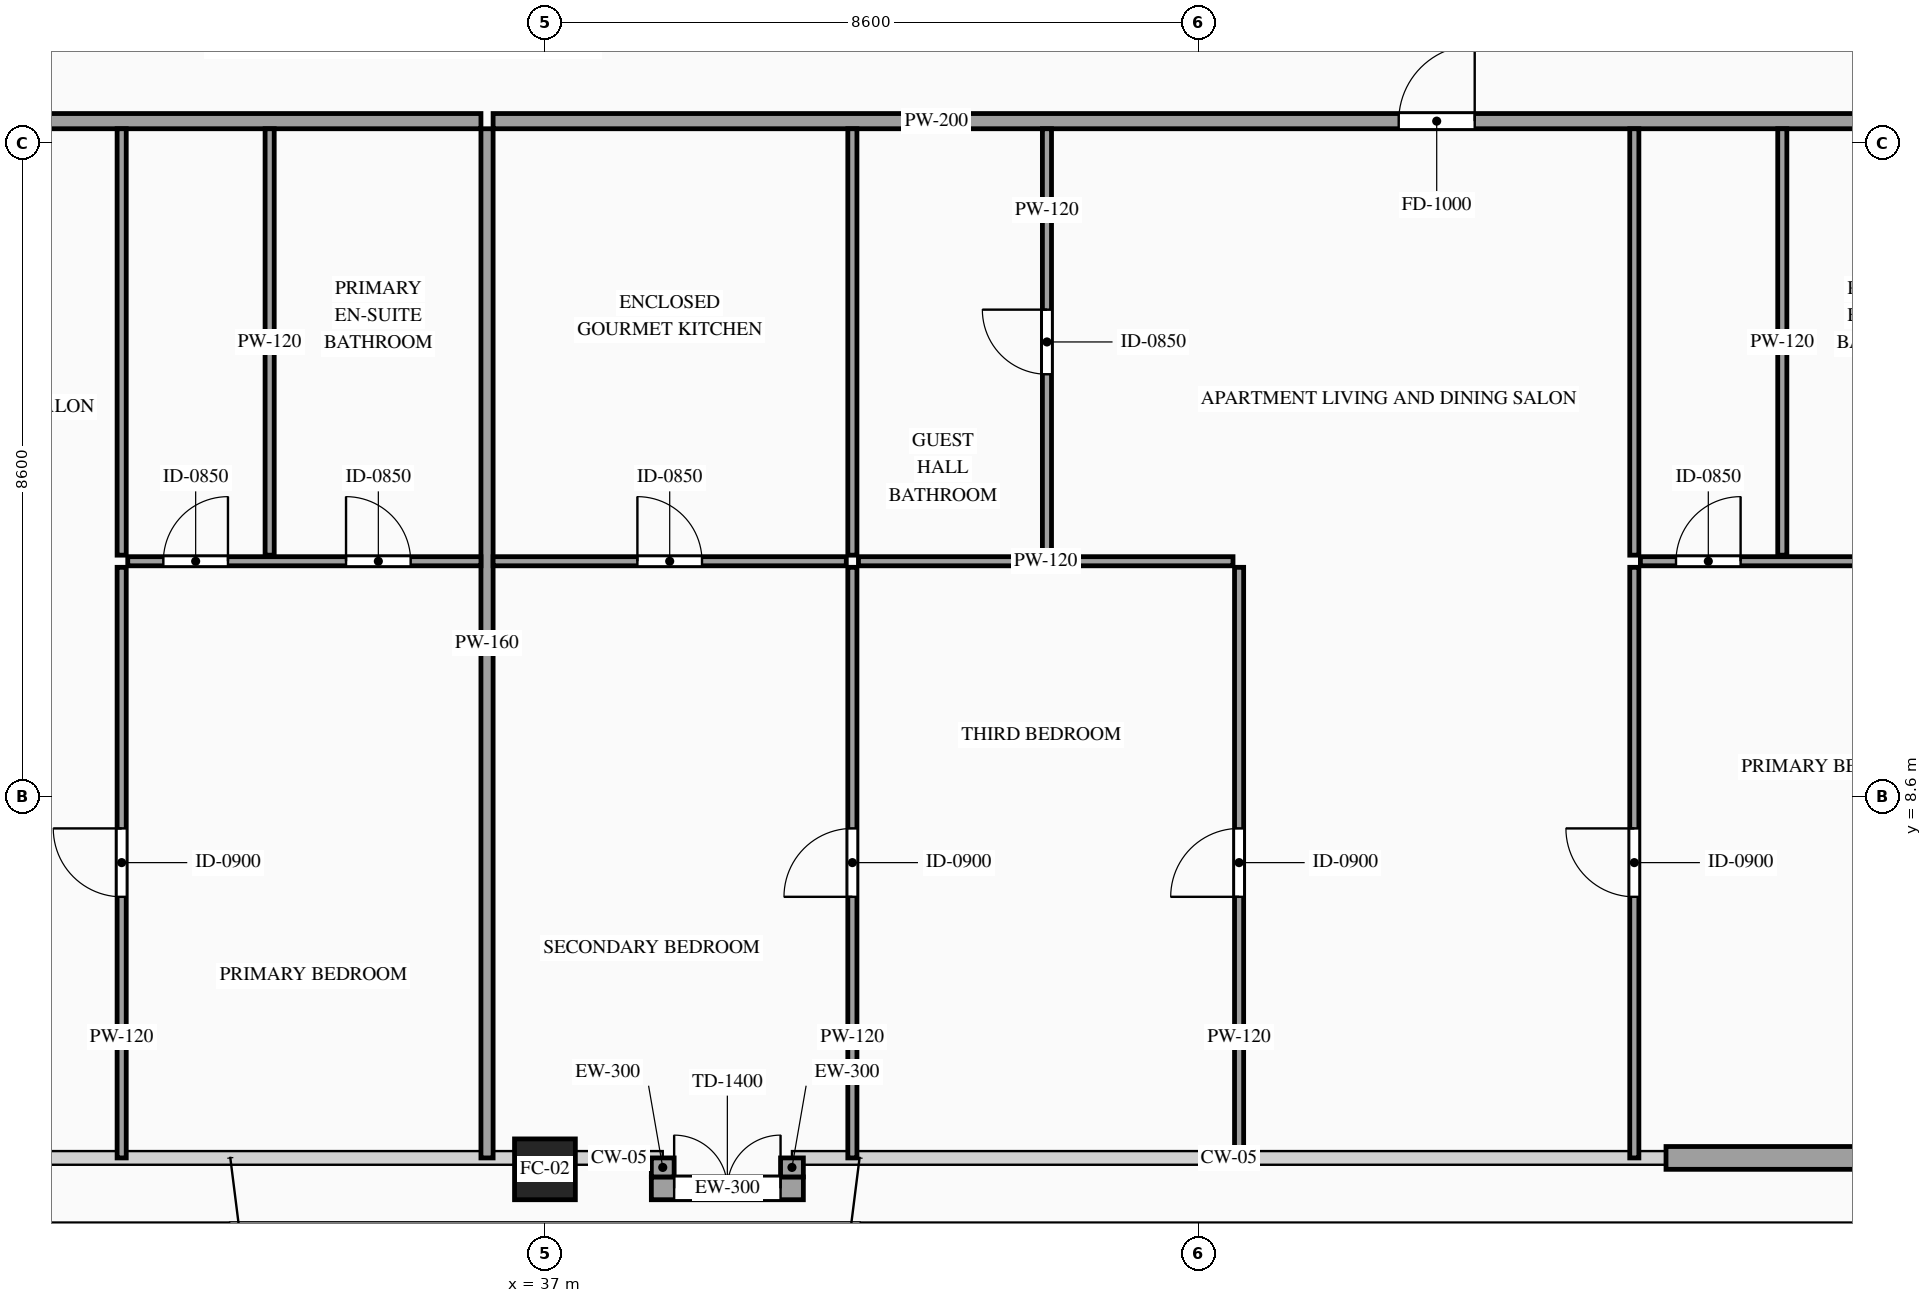
"""IFC4 building model, lengths in metres.
Left out: names, types, materials, properties, quantities, classifications, styles, units other than length and angle.
Written with IfcOpenShell. Run it as: python <this file> out.ifc"""

import sys

from ifc_helpers import new_model, si_unit, direction, frame, frame_2d, origin, origin_2d, place, context, subcontext, project, spatial, rectangle, hollow_rectangle, extrude, source, transform, mapped, element, fill, save


model = new_model("IFC4")
c1 = context("Model", 3, precision=1e-05, world=origin(), true_north=direction((0.0, 1.0)))
c2 = subcontext(c1, "Body", "Model", "MODEL_VIEW")
j1 = project(units=[si_unit("LENGTHUNIT", "METRE"), si_unit("PLANEANGLEUNIT", "RADIAN")], contexts=[c1])
p1 = place(None, origin())
s1 = spatial("IfcSite", under=j1, at=p1, CompositionType="ELEMENT")
p2 = place(p1, origin())
s2 = spatial("IfcBuilding", under=s1, at=p2, CompositionType="ELEMENT")
p3 = place(p2, frame((0.0, 0.0, 198.5)))
s3 = spatial("IfcBuildingStorey", under=s2, at=p3, CompositionType="ELEMENT", Elevation=198.5)
m1 = source(origin(), c2, "Body", "SweptSolid", [
    extrude(hollow_rectangle(XDim=0.8, YDim=0.8, WallThickness=0.036, at=origin_2d()), origin(), (0.0, 0.0, 1.0), 3.5),
])
p4 = place(p3, frame((37.0, 3.7, 0.0), z_axis=(0.0, 0.0, 1.0), x_axis=(1.0, 0.0, 0.0)))
e1 = element("IfcColumn", 1, at=p4, inside=s3, PredefinedType="COLUMN", context=c2, shape_type="MappedRepresentation", body=[
    mapped(m1, transform((0.0, 0.0, 0.0), scale=1.0)),
])
m2 = source(origin(), c2, "Body", "SweptSolid", [
    extrude(rectangle(XDim=3.05, YDim=0.3, at=frame_2d((1.525, 0.0))), origin(), (0.0, 0.0, 1.0), 2.835),
])
p5 = place(p3, frame((51.75, 3.85, 0.0), z_axis=(0.0, 0.0, 1.0), x_axis=(1.0, 0.0, 0.0)))
e2 = element("IfcWall", 2, at=p5, inside=s3, PredefinedType="SOLIDWALL", context=c2, shape_type="MappedRepresentation", body=[
    mapped(m2, transform((0.0, 0.0, 0.0), scale=1.0)),
])
p6 = place(p3, frame((38.4, 3.45, 0.0), z_axis=(0.0, 0.0, 1.0), x_axis=(1.0, 0.0, 0.0)))
e3 = element("IfcWall", 3, at=p6, inside=s3, PredefinedType="SOLIDWALL", context=c2, shape_type="SweptSolid", body=[
    extrude(rectangle(XDim=2.0, YDim=0.3, at=frame_2d((1.0, 0.0))), origin(), (0.0, 0.0, 1.0), 2.835),
])
p7 = place(p6, frame((0.3, 0.0, 0.0)))
e4 = element("IfcOpeningElement", 4, at=p7, cuts=e3, PredefinedType="OPENING", context=c2, shape_type="SweptSolid", body=[
    extrude(rectangle(XDim=1.4, YDim=2.3, at=frame_2d((0.7, 1.15))), frame((0.0, 0.165, 0.0), z_axis=(0.0, -1.0, 0.0), x_axis=(1.0, 0.0, 0.0)), (0.0, 0.0, 1.0), 0.33),
])
m3 = source(origin(), c2, "Body", "SweptSolid", [
    extrude(rectangle(XDim=0.25, YDim=0.3, at=frame_2d((0.125, 0.0))), origin(), (0.0, 0.0, 1.0), 3.28),
])
for number, where, z_axis, x_axis in (
    (5, (38.55, 3.85, 0.0), (0.0, 0.0, 1.0), (0.0, -1.0, 0.0)),
    (6, (40.25, 3.6, 0.0), (0.0, 0.0, 1.0), (0.0, 1.0, 0.0)),
):
    element("IfcWall", number, at=place(p3, frame(where, z_axis=z_axis, x_axis=x_axis)), inside=s3, PredefinedType="SOLIDWALL", context=c2, shape_type="MappedRepresentation", body=[
        mapped(m3, transform((0.0, 0.0, 0.0), scale=1.0)),
    ])
p8 = place(p3, frame((17.94, 17.49, 0.0), z_axis=(0.0, 0.0, 1.0), x_axis=(1.0, 0.0, 0.0)))
e7 = element("IfcWall", 7, at=p8, inside=s3, PredefinedType="PARTITIONING", context=c2, shape_type="SweptSolid", body=[
    extrude(rectangle(XDim=18.218, YDim=0.2, at=frame_2d((9.109, 0.0))), origin(), (0.0, 0.0, 1.0), 3.28),
])
p9 = place(p8, frame((10.556, 0.0, 0.0)))
e8 = element("IfcOpeningElement", 8, at=p9, cuts=e7, PredefinedType="OPENING", context=c2, shape_type="SweptSolid", body=[
    extrude(rectangle(XDim=1.0, YDim=2.2, at=frame_2d((0.5, 1.1))), frame((0.0, 0.115, 0.0), z_axis=(0.0, -1.0, 0.0), x_axis=(1.0, 0.0, 0.0)), (0.0, 0.0, 1.0), 0.23),
])
m4 = source(origin(), c2, "Body", "SweptSolid", [
    extrude(rectangle(XDim=13.54, YDim=0.16, at=frame_2d((6.77, 0.0))), origin(), (0.0, 0.0, 1.0), 3.28),
])
p10 = place(p3, frame((36.238, 3.85, 0.0), z_axis=(0.0, 0.0, 1.0), x_axis=(0.0, 1.0, 0.0)))
e9 = element("IfcWall", 9, at=p10, inside=s3, PredefinedType="PARTITIONING", context=c2, shape_type="MappedRepresentation", body=[
    mapped(m4, transform((0.0, 0.0, 0.0), scale=1.0)),
])
m5 = source(origin(), c2, "Body", "SweptSolid", [
    extrude(rectangle(XDim=5.61, YDim=0.12, at=frame_2d((2.805, 0.0))), origin(), (0.0, 0.0, 1.0), 3.28),
])
for number, where, z_axis, x_axis in (
    (10, (33.378, 11.78, 0.0), (0.0, 0.0, 1.0), (0.0, 1.0, 0.0)),
    (11, (31.431, 11.78, 0.0), (0.0, 0.0, 1.0), (0.0, 1.0, 0.0)),
):
    element("IfcWall", number, at=place(p3, frame(where, z_axis=z_axis, x_axis=x_axis)), inside=s3, PredefinedType="PARTITIONING", context=c2, shape_type="MappedRepresentation", body=[
        mapped(m5, transform((0.0, 0.0, 0.0), scale=1.0)),
    ])
p11 = place(p3, frame((31.511, 11.7, 0.0), z_axis=(0.0, 0.0, 1.0), x_axis=(1.0, 0.0, 0.0)))
e12 = element("IfcWall", 12, at=p11, inside=s3, PredefinedType="PARTITIONING", context=c2, shape_type="SweptSolid", body=[
    extrude(rectangle(XDim=4.647, YDim=0.12, at=frame_2d((2.323, 0.0))), origin(), (0.0, 0.0, 1.0), 2.875),
])
p12 = place(p11, frame((2.872, 0.0, 0.0)))
e13 = element("IfcOpeningElement", 13, at=p12, cuts=e12, PredefinedType="OPENING", context=c2, shape_type="SweptSolid", body=[
    extrude(rectangle(XDim=0.85, YDim=2.1, at=frame_2d((0.425, 1.05))), frame((0.0, 0.075, 0.0), z_axis=(0.0, -1.0, 0.0), x_axis=(1.0, 0.0, 0.0)), (0.0, 0.0, 1.0), 0.15),
])
p13 = place(p11, frame((0.469, 0.0, 0.0)))
e14 = element("IfcOpeningElement", 14, at=p13, cuts=e12, PredefinedType="OPENING", context=c2, shape_type="SweptSolid", body=[
    extrude(rectangle(XDim=0.85, YDim=2.1, at=frame_2d((0.425, 1.05))), frame((0.0, 0.075, 0.0), z_axis=(0.0, -1.0, 0.0), x_axis=(1.0, 0.0, 0.0)), (0.0, 0.0, 1.0), 0.15),
])
p14 = place(p3, frame((31.431, 3.85, 0.0), z_axis=(0.0, 0.0, 1.0), x_axis=(0.0, 1.0, 0.0)))
e15 = element("IfcWall", 15, at=p14, inside=s3, PredefinedType="PARTITIONING", context=c2, shape_type="SweptSolid", body=[
    extrude(rectangle(XDim=7.77, YDim=0.12, at=frame_2d((3.885, 0.0))), origin(), (0.0, 0.0, 1.0), 3.28),
])
p15 = place(p14, frame((3.435, 0.0, 0.0)))
e16 = element("IfcOpeningElement", 16, at=p15, cuts=e15, PredefinedType="OPENING", context=c2, shape_type="SweptSolid", body=[
    extrude(rectangle(XDim=0.9, YDim=2.15, at=frame_2d((0.45, 1.075))), frame((0.0, 0.075, 0.0), z_axis=(0.0, -1.0, 0.0), x_axis=(1.0, 0.0, 0.0)), (0.0, 0.0, 1.0), 0.15),
])
p16 = place(p3, frame((36.318, 17.49, 0.0), z_axis=(0.0, 0.0, 1.0), x_axis=(1.0, 0.0, 0.0)))
e17 = element("IfcWall", 17, at=p16, inside=s3, PredefinedType="PARTITIONING", context=c2, shape_type="SweptSolid", body=[
    extrude(rectangle(XDim=19.742, YDim=0.2, at=frame_2d((9.871, 0.0))), origin(), (0.0, 0.0, 1.0), 3.28),
])
p17 = place(p16, frame((11.915, 0.0, 0.0)))
e18 = element("IfcOpeningElement", 18, at=p17, cuts=e17, PredefinedType="OPENING", context=c2, shape_type="SweptSolid", body=[
    extrude(rectangle(XDim=1.0, YDim=2.2, at=frame_2d((0.5, 1.1))), frame((0.0, 0.115, 0.0), z_axis=(0.0, -1.0, 0.0), x_axis=(1.0, 0.0, 0.0)), (0.0, 0.0, 1.0), 0.23),
])
p18 = place(p3, frame((36.318, 11.7, 0.0), z_axis=(0.0, 0.0, 1.0), x_axis=(1.0, 0.0, 0.0)))
e19 = element("IfcWall", 19, at=p18, inside=s3, PredefinedType="PARTITIONING", context=c2, shape_type="SweptSolid", body=[
    extrude(rectangle(XDim=4.647, YDim=0.12, at=frame_2d((2.323, 0.0))), origin(), (0.0, 0.0, 1.0), 2.875),
])
p19 = place(p18, frame((1.898, 0.0, 0.0)))
e20 = element("IfcOpeningElement", 20, at=p19, cuts=e19, PredefinedType="OPENING", context=c2, shape_type="SweptSolid", body=[
    extrude(rectangle(XDim=0.85, YDim=2.1, at=frame_2d((0.425, 1.05))), frame((0.0, 0.075, 0.0), z_axis=(0.0, -1.0, 0.0), x_axis=(1.0, 0.0, 0.0)), (0.0, 0.0, 1.0), 0.15),
])
p20 = place(p3, frame((41.045, 11.78, 0.0), z_axis=(0.0, 0.0, 1.0), x_axis=(0.0, 1.0, 0.0)))
e21 = element("IfcWall", 21, at=p20, inside=s3, PredefinedType="PARTITIONING", context=c2, shape_type="MappedRepresentation", body=[
    mapped(m5, transform((0.0, 0.0, 0.0), scale=1.0)),
])
p21 = place(p3, frame((43.605, 11.78, 0.0), z_axis=(0.0, 0.0, 1.0), x_axis=(0.0, 1.0, 0.0)))
e22 = element("IfcWall", 22, at=p21, inside=s3, PredefinedType="PARTITIONING", context=c2, shape_type="SweptSolid", body=[
    extrude(rectangle(XDim=5.61, YDim=0.12, at=frame_2d((2.805, 0.0))), origin(), (0.0, 0.0, 1.0), 3.28),
])
p22 = place(p21, frame((2.38, 0.0, 0.0)))
e23 = element("IfcOpeningElement", 23, at=p22, cuts=e22, PredefinedType="OPENING", context=c2, shape_type="SweptSolid", body=[
    extrude(rectangle(XDim=0.85, YDim=2.1, at=frame_2d((0.425, 1.05))), frame((0.0, 0.075, 0.0), z_axis=(0.0, -1.0, 0.0), x_axis=(1.0, 0.0, 0.0)), (0.0, 0.0, 1.0), 0.15),
])
for number, where, z_axis, x_axis in (
    (24, (53.28, 11.78, 0.0), (0.0, 0.0, 1.0), (0.0, 1.0, 0.0)),
    (25, (51.333, 11.78, 0.0), (0.0, 0.0, 1.0), (0.0, 1.0, 0.0)),
):
    element("IfcWall", number, at=place(p3, frame(where, z_axis=z_axis, x_axis=x_axis)), inside=s3, PredefinedType="PARTITIONING", context=c2, shape_type="MappedRepresentation", body=[
        mapped(m5, transform((0.0, 0.0, 0.0), scale=1.0)),
    ])
p23 = place(p3, frame((41.045, 3.85, 0.0), z_axis=(0.0, 0.0, 1.0), x_axis=(0.0, 1.0, 0.0)))
e26 = element("IfcWall", 26, at=p23, inside=s3, PredefinedType="PARTITIONING", context=c2, shape_type="SweptSolid", body=[
    extrude(rectangle(XDim=7.77, YDim=0.12, at=frame_2d((3.885, 0.0))), origin(), (0.0, 0.0, 1.0), 3.28),
])
p24 = place(p23, frame((3.435, 0.0, 0.0)))
e27 = element("IfcOpeningElement", 27, at=p24, cuts=e26, PredefinedType="OPENING", context=c2, shape_type="SweptSolid", body=[
    extrude(rectangle(XDim=0.9, YDim=2.15, at=frame_2d((0.45, 1.075))), frame((0.0, 0.075, 0.0), z_axis=(0.0, -1.0, 0.0), x_axis=(1.0, 0.0, 0.0)), (0.0, 0.0, 1.0), 0.15),
])
p25 = place(p3, frame((51.413, 11.7, 0.0), z_axis=(0.0, 0.0, 1.0), x_axis=(1.0, 0.0, 0.0)))
e28 = element("IfcWall", 28, at=p25, inside=s3, PredefinedType="PARTITIONING", context=c2, shape_type="SweptSolid", body=[
    extrude(rectangle(XDim=4.647, YDim=0.12, at=frame_2d((2.323, 0.0))), origin(), (0.0, 0.0, 1.0), 3.28),
])
p26 = place(p25, frame((2.872, 0.0, 0.0)))
e29 = element("IfcOpeningElement", 29, at=p26, cuts=e28, PredefinedType="OPENING", context=c2, shape_type="SweptSolid", body=[
    extrude(rectangle(XDim=0.85, YDim=2.1, at=frame_2d((0.425, 1.05))), frame((0.0, 0.075, 0.0), z_axis=(0.0, -1.0, 0.0), x_axis=(1.0, 0.0, 0.0)), (0.0, 0.0, 1.0), 0.15),
])
p27 = place(p25, frame((0.469, 0.0, 0.0)))
e30 = element("IfcOpeningElement", 30, at=p27, cuts=e28, PredefinedType="OPENING", context=c2, shape_type="SweptSolid", body=[
    extrude(rectangle(XDim=0.85, YDim=2.1, at=frame_2d((0.425, 1.05))), frame((0.0, 0.075, 0.0), z_axis=(0.0, -1.0, 0.0), x_axis=(1.0, 0.0, 0.0)), (0.0, 0.0, 1.0), 0.15),
])
p28 = place(p3, frame((51.333, 3.85, 0.0), z_axis=(0.0, 0.0, 1.0), x_axis=(0.0, 1.0, 0.0)))
e31 = element("IfcWall", 31, at=p28, inside=s3, PredefinedType="PARTITIONING", context=c2, shape_type="SweptSolid", body=[
    extrude(rectangle(XDim=7.77, YDim=0.12, at=frame_2d((3.885, 0.0))), origin(), (0.0, 0.0, 1.0), 3.28),
])
p29 = place(p28, frame((3.435, 0.0, 0.0)))
e32 = element("IfcOpeningElement", 32, at=p29, cuts=e31, PredefinedType="OPENING", context=c2, shape_type="SweptSolid", body=[
    extrude(rectangle(XDim=0.9, YDim=2.15, at=frame_2d((0.45, 1.075))), frame((0.0, 0.075, 0.0), z_axis=(0.0, -1.0, 0.0), x_axis=(1.0, 0.0, 0.0)), (0.0, 0.0, 1.0), 0.15),
])
m6 = source(origin(), c2, "Body", "SweptSolid", [
    extrude(rectangle(XDim=4.928, YDim=0.12, at=frame_2d((2.464, 0.0))), origin(), (0.0, 0.0, 1.0), 2.875),
])
p30 = place(p3, frame((41.125, 11.7, 0.0), z_axis=(0.0, 0.0, 1.0), x_axis=(1.0, 0.0, 0.0)))
e33 = element("IfcWall", 33, at=p30, inside=s3, PredefinedType="PARTITIONING", context=c2, shape_type="MappedRepresentation", body=[
    mapped(m6, transform((0.0, 0.0, 0.0), scale=1.0)),
])
p31 = place(p3, frame((46.133, 3.85, 0.0), z_axis=(0.0, 0.0, 1.0), x_axis=(0.0, 1.0, 0.0)))
e34 = element("IfcWall", 34, at=p31, inside=s3, PredefinedType="PARTITIONING", context=c2, shape_type="SweptSolid", body=[
    extrude(rectangle(XDim=7.77, YDim=0.12, at=frame_2d((3.885, 0.0))), origin(), (0.0, 0.0, 1.0), 3.28),
])
p32 = place(p31, frame((3.435, 0.0, 0.0)))
e35 = element("IfcOpeningElement", 35, at=p32, cuts=e34, PredefinedType="OPENING", context=c2, shape_type="SweptSolid", body=[
    extrude(rectangle(XDim=0.9, YDim=2.15, at=frame_2d((0.45, 1.075))), frame((0.0, 0.075, 0.0), z_axis=(0.0, -1.0, 0.0), x_axis=(1.0, 0.0, 0.0)), (0.0, 0.0, 1.0), 0.15),
])
m7 = source(origin(), c2, "Body", "SweptSolid", [
    extrude(rectangle(XDim=1.4, YDim=2.3, at=frame_2d((0.7, 1.15))), frame((0.0, 0.025, 0.0), z_axis=(0.0, -1.0, 0.0), x_axis=(1.0, 0.0, 0.0)), (0.0, 0.0, 1.0), 0.05),
])
p33 = place(p7, origin())
e36 = element("IfcDoor", 36, at=p33, inside=s3, OperationType="DOUBLE_DOOR_SINGLE_SWING", PredefinedType="DOOR", context=c2, shape_type="MappedRepresentation", body=[
    mapped(m7, transform((0.0, 0.0, 0.0), scale=1.0)),
])
fill(e4, e36)
m8 = source(origin(), c2, "Body", "SweptSolid", [
    extrude(rectangle(XDim=0.85, YDim=2.1, at=frame_2d((0.425, 1.05))), frame((0.0, 0.025, 0.0), z_axis=(0.0, -1.0, 0.0), x_axis=(1.0, 0.0, 0.0)), (0.0, 0.0, 1.0), 0.05),
])
p34 = place(p12, origin())
e37 = element("IfcDoor", 37, at=p34, inside=s3, OperationType="SINGLE_SWING_LEFT", PredefinedType="DOOR", context=c2, shape_type="MappedRepresentation", body=[
    mapped(m8, transform((0.0, 0.0, 0.0), scale=1.0)),
])
fill(e13, e37)
p35 = place(p13, origin())
e38 = element("IfcDoor", 38, at=p35, inside=s3, OperationType="SINGLE_SWING_RIGHT", PredefinedType="DOOR", context=c2, shape_type="MappedRepresentation", body=[
    mapped(m8, transform((0.0, 0.0, 0.0), scale=1.0)),
])
fill(e14, e38)
m9 = source(origin(), c2, "Body", "SweptSolid", [
    extrude(rectangle(XDim=0.9, YDim=2.15, at=frame_2d((0.45, 1.075))), frame((0.0, 0.025, 0.0), z_axis=(0.0, -1.0, 0.0), x_axis=(1.0, 0.0, 0.0)), (0.0, 0.0, 1.0), 0.05),
])
p36 = place(p15, origin())
e39 = element("IfcDoor", 39, at=p36, inside=s3, OperationType="SINGLE_SWING_RIGHT", PredefinedType="DOOR", context=c2, shape_type="MappedRepresentation", body=[
    mapped(m9, transform((0.0, 0.0, 0.0), scale=1.0)),
])
fill(e16, e39)
m10 = source(origin(), c2, "Body", "SweptSolid", [
    extrude(rectangle(XDim=1.0, YDim=2.2, at=frame_2d((0.5, 1.1))), frame((0.0, 0.025, 0.0), z_axis=(0.0, -1.0, 0.0), x_axis=(1.0, 0.0, 0.0)), (0.0, 0.0, 1.0), 0.05),
])
p37 = place(p17, origin())
e40 = element("IfcDoor", 40, at=p37, inside=s3, OperationType="SINGLE_SWING_RIGHT", PredefinedType="DOOR", context=c2, shape_type="MappedRepresentation", body=[
    mapped(m10, transform((0.0, 0.0, 0.0), scale=1.0)),
])
fill(e18, e40)
p38 = place(p19, origin())
e41 = element("IfcDoor", 41, at=p38, inside=s3, OperationType="SINGLE_SWING_LEFT", PredefinedType="DOOR", context=c2, shape_type="MappedRepresentation", body=[
    mapped(m8, transform((0.0, 0.0, 0.0), scale=1.0)),
])
fill(e20, e41)
p39 = place(p22, origin())
e42 = element("IfcDoor", 42, at=p39, inside=s3, OperationType="SINGLE_SWING_RIGHT", PredefinedType="DOOR", context=c2, shape_type="MappedRepresentation", body=[
    mapped(m8, transform((0.0, 0.0, 0.0), scale=1.0)),
])
fill(e23, e42)
p40 = place(p27, origin())
e43 = element("IfcDoor", 43, at=p40, inside=s3, OperationType="SINGLE_SWING_RIGHT", PredefinedType="DOOR", context=c2, shape_type="MappedRepresentation", body=[
    mapped(m8, transform((0.0, 0.0, 0.0), scale=1.0)),
])
fill(e30, e43)
p41 = place(p24, origin())
e44 = element("IfcDoor", 44, at=p41, inside=s3, OperationType="SINGLE_SWING_LEFT", PredefinedType="DOOR", context=c2, shape_type="MappedRepresentation", body=[
    mapped(m9, transform((0.0, 0.0, 0.0), scale=1.0)),
])
fill(e27, e44)
p42 = place(p29, origin())
e45 = element("IfcDoor", 45, at=p42, inside=s3, OperationType="SINGLE_SWING_RIGHT", PredefinedType="DOOR", context=c2, shape_type="MappedRepresentation", body=[
    mapped(m9, transform((0.0, 0.0, 0.0), scale=1.0)),
])
fill(e32, e45)
p43 = place(p32, origin())
e46 = element("IfcDoor", 46, at=p43, inside=s3, OperationType="SINGLE_SWING_LEFT", PredefinedType="DOOR", context=c2, shape_type="MappedRepresentation", body=[
    mapped(m9, transform((0.0, 0.0, 0.0), scale=1.0)),
])
fill(e35, e46)
save(model, sys.argv[1])
